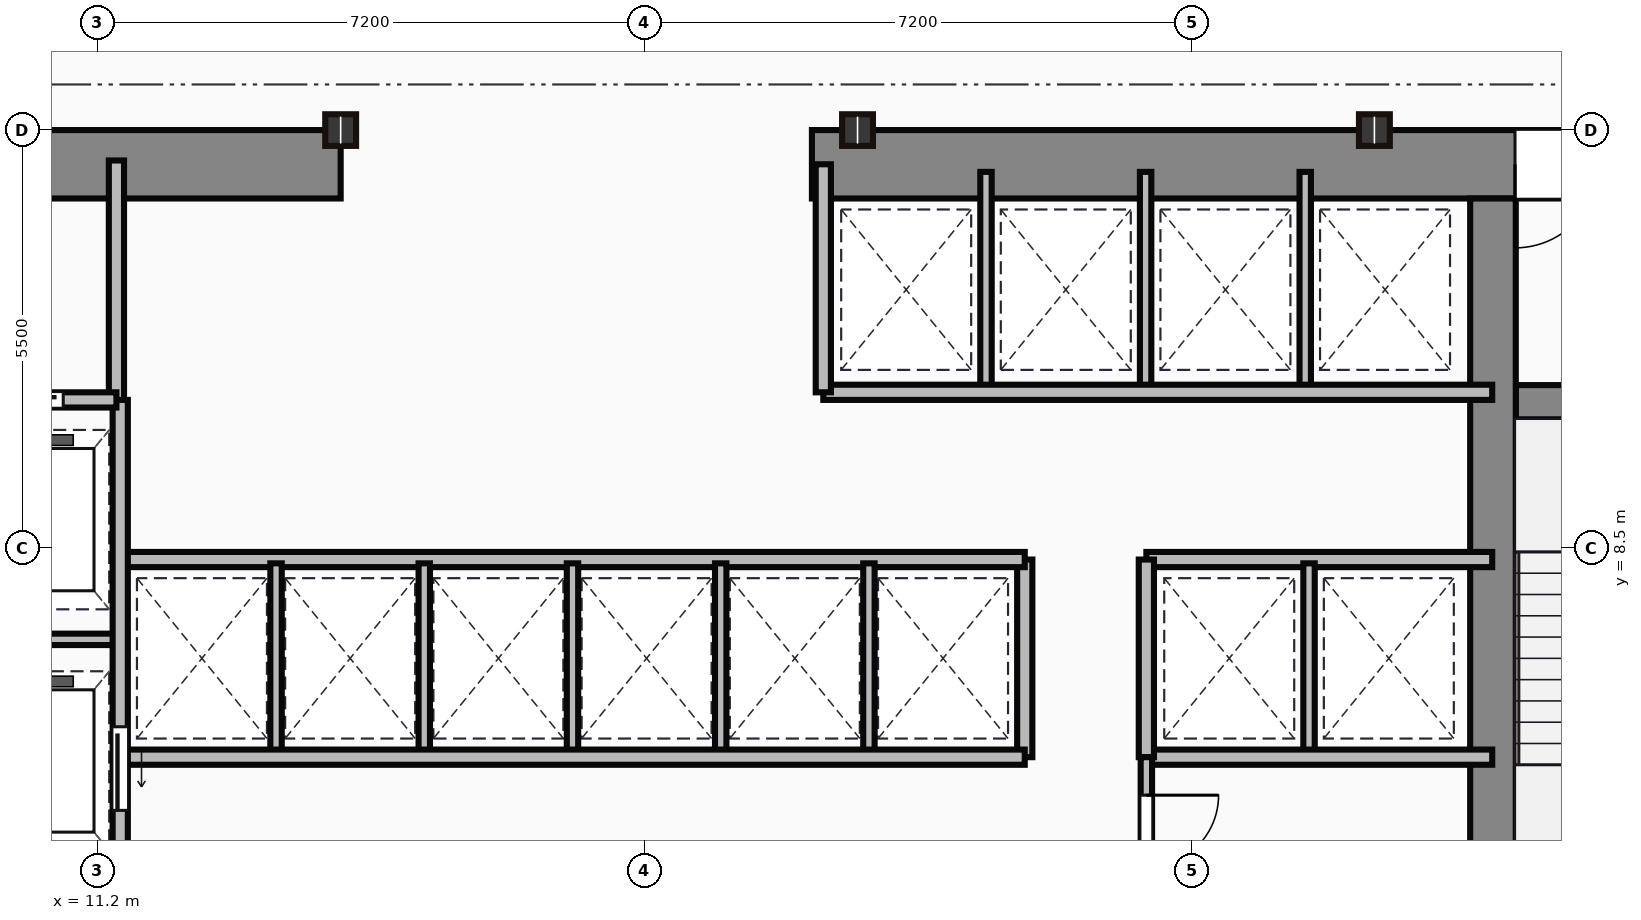
"""IFC4 building model, lengths in metres.
Left out: names, types, materials, properties, quantities, classifications, styles, units other than length and angle.
Written with IfcOpenShell. Run it as: python <this file> out.ifc"""

import sys

from ifc_helpers import new_model, si_unit, direction, frame, frame_2d, origin, origin_2d, place, context, subcontext, project, spatial, rectangle, i_section, extrude, source, transform, mapped, element, fill, save


model = new_model("IFC4")
c1 = context("Model", 3, precision=1e-05, world=origin(), true_north=direction((0.0, 1.0)))
c2 = subcontext(c1, "Body", "Model", "MODEL_VIEW")
j1 = project(units=[si_unit("LENGTHUNIT", "METRE"), si_unit("PLANEANGLEUNIT", "RADIAN")], contexts=[c1])
p1 = place(None, origin())
s1 = spatial("IfcSite", under=j1, at=p1, CompositionType="ELEMENT")
p2 = place(p1, origin())
s2 = spatial("IfcBuilding", under=s1, at=p2, CompositionType="ELEMENT")
p3 = place(p2, frame((0.0, 0.0, 47.1)))
s3 = spatial("IfcBuildingStorey", under=s2, at=p3, CompositionType="ELEMENT", Elevation=47.1)
m1 = source(origin(), c2, "Body", "SweptSolid", [
    extrude(rectangle(XDim=9.1, YDim=0.9, at=frame_2d((4.55, 0.0))), origin(), (0.0, 0.0, 1.0), 3.65),
])
p4 = place(p3, frame((5.3, 13.55, 0.0), z_axis=(0.0, 0.0, 1.0), x_axis=(1.0, 0.0, 0.0)))
e1 = element("IfcWall", 1, at=p4, inside=s3, PredefinedType="SHEAR", context=c2, shape_type="MappedRepresentation", body=[
    mapped(m1, transform((0.0, 0.0, 0.0))),
])
p5 = place(p4, frame((4.1, 0.0, 0.0)))
e2 = element("IfcOpeningElement", 2, at=p5, cuts=e1, PredefinedType="OPENING", context=c2, shape_type="SweptSolid", body=[
    extrude(rectangle(XDim=1.1, YDim=2.15, at=frame_2d((0.55, 1.075))), frame((0.0, 0.46, 0.0), z_axis=(0.0, -1.0, 0.0), x_axis=(1.0, 0.0, 0.0)), (0.0, 0.0, 1.0), 0.92),
])
m2 = source(origin(), c2, "Body", "SweptSolid", [
    extrude(rectangle(XDim=12.6, YDim=0.9, at=frame_2d((6.3, 0.0))), origin(), (0.0, 0.0, 1.0), 3.65),
])
p6 = place(p3, frame((20.6, 13.55, 0.0), z_axis=(0.0, 0.0, 1.0), x_axis=(1.0, 0.0, 0.0)))
e3 = element("IfcWall", 3, at=p6, inside=s3, PredefinedType="SHEAR", context=c2, shape_type="MappedRepresentation", body=[
    mapped(m2, transform((0.0, 0.0, 0.0))),
])
p7 = place(p6, frame((9.25, 0.0, 0.0)))
e4 = element("IfcOpeningElement", 4, at=p7, cuts=e3, PredefinedType="OPENING", context=c2, shape_type="SweptSolid", body=[
    extrude(rectangle(XDim=1.1, YDim=2.15, at=frame_2d((0.55, 1.075))), frame((0.0, 0.46, 0.0), z_axis=(0.0, -1.0, 0.0), x_axis=(1.0, 0.0, 0.0)), (0.0, 0.0, 1.0), 0.92),
])
m3 = source(origin(), c2, "Body", "SweptSolid", [
    extrude(rectangle(XDim=12.2, YDim=0.6, at=frame_2d((6.1, 0.0))), origin(), (0.0, 0.0, 1.0), 3.65),
])
p8 = place(p3, frame((29.56, 0.9, 0.0), z_axis=(0.0, 0.0, 1.0), x_axis=(0.0, 1.0, 0.0)))
e5 = element("IfcWall", 5, at=p8, inside=s3, PredefinedType="SHEAR", context=c2, shape_type="MappedRepresentation", body=[
    mapped(m3, transform((0.0, 0.0, 0.0))),
])
m4 = source(origin(), c2, "Body", "SweptSolid", [
    extrude(rectangle(XDim=3.39, YDim=0.45, at=frame_2d((1.695, 0.0))), origin(), (0.0, 0.0, 1.0), 3.65),
])
p9 = place(p3, frame((29.86, 10.42, 0.0), z_axis=(0.0, 0.0, 1.0), x_axis=(1.0, 0.0, 0.0)))
e6 = element("IfcWall", 6, at=p9, inside=s3, PredefinedType="SHEAR", context=c2, shape_type="MappedRepresentation", body=[
    mapped(m4, transform((0.0, 0.0, 0.0))),
])
p10 = place(p9, frame((1.1, 0.0, 0.0)))
e7 = element("IfcOpeningElement", 7, at=p10, cuts=e6, PredefinedType="OPENING", context=c2, shape_type="SweptSolid", body=[
    extrude(rectangle(XDim=1.1, YDim=2.15, at=frame_2d((0.55, 1.075))), frame((0.0, 0.235, 0.0), z_axis=(0.0, -1.0, 0.0), x_axis=(1.0, 0.0, 0.0)), (0.0, 0.0, 1.0), 0.47),
])
m5 = source(origin(), c2, "Body", "SweptSolid", [
    extrude(i_section(OverallWidth=0.406, OverallDepth=0.416, WebThickness=0.03, FlangeThickness=0.048, at=origin_2d()), origin(), (0.0, 0.0, 1.0), 3.65),
])
for number, where, z_axis, x_axis in (
    (8, (14.4, 14.0, 0.0), (0.0, 0.0, 1.0), (1.0, 0.0, 0.0)),
    (9, (21.2, 14.0, 0.0), (0.0, 0.0, 1.0), (1.0, 0.0, 0.0)),
    (10, (28.0, 14.0, 0.0), (0.0, 0.0, 1.0), (1.0, 0.0, 0.0)),
):
    element("IfcColumn", number, at=place(p3, frame(where, z_axis=z_axis, x_axis=x_axis)), inside=s3, PredefinedType="COLUMN", context=c2, shape_type="MappedRepresentation", body=[
        mapped(m5, transform((0.0, 0.0, 0.0))),
    ])
m6 = source(origin(), c2, "Body", "SweptSolid", [
    extrude(rectangle(XDim=3.18, YDim=0.2, at=frame_2d((1.59, 0.0))), origin(), (0.0, 0.0, 1.0), 3.4),
])
p11 = place(p3, frame((11.45, 10.42, 0.0), z_axis=(0.0, 0.0, 1.0), x_axis=(0.0, 1.0, 0.0)))
e11 = element("IfcWall", 11, at=p11, inside=s3, PredefinedType="PARTITIONING", context=c2, shape_type="MappedRepresentation", body=[
    mapped(m6, transform((0.0, 0.0, 0.0))),
])
m7 = source(origin(), c2, "Body", "SweptSolid", [
    extrude(rectangle(XDim=2.35, YDim=0.2, at=frame_2d((1.175, 0.0))), origin(), (0.0, 0.0, 1.0), 3.4),
])
p12 = place(p3, frame((9.1, 10.45, 0.0), z_axis=(0.0, 0.0, 1.0), x_axis=(1.0, 0.0, 0.0)))
e12 = element("IfcWall", 12, at=p12, inside=s3, PredefinedType="PARTITIONING", context=c2, shape_type="MappedRepresentation", body=[
    mapped(m7, transform((0.0, 0.0, 0.0))),
])
p13 = place(p12, frame((0.55, 0.0, 0.0)))
e13 = element("IfcOpeningElement", 13, at=p13, cuts=e12, PredefinedType="OPENING", context=c2, shape_type="SweptSolid", body=[
    extrude(rectangle(XDim=1.1, YDim=2.15, at=frame_2d((0.55, 1.075))), frame((0.0, 0.11, 0.0), z_axis=(0.0, -1.0, 0.0), x_axis=(1.0, 0.0, 0.0)), (0.0, 0.0, 1.0), 0.22),
])
m8 = source(origin(), c2, "Body", "SweptSolid", [
    extrude(rectangle(XDim=9.6, YDim=0.2, at=frame_2d((4.8, 0.0))), origin(), (0.0, 0.0, 1.0), 3.4),
])
p14 = place(p3, frame((11.5, 0.85, 0.0), z_axis=(0.0, 0.0, 1.0), x_axis=(0.0, 1.0, 0.0)))
e14 = element("IfcWall", 14, at=p14, inside=s3, PredefinedType="PARTITIONING", context=c2, shape_type="MappedRepresentation", body=[
    mapped(m8, transform((0.0, 0.0, 0.0))),
])
p15 = place(p14, frame((4.2, 0.0, 0.0)))
e15 = element("IfcOpeningElement", 15, at=p15, cuts=e14, PredefinedType="OPENING", context=c2, shape_type="SweptSolid", body=[
    extrude(rectangle(XDim=1.1, YDim=2.15, at=frame_2d((0.55, 1.075))), frame((0.0, 0.11, 0.0), z_axis=(0.0, -1.0, 0.0), x_axis=(1.0, 0.0, 0.0)), (0.0, 0.0, 1.0), 0.22),
])
p16 = place(p14, frame((0.9, 0.0, 0.0)))
e16 = element("IfcOpeningElement", 16, at=p16, cuts=e14, PredefinedType="OPENING", context=c2, shape_type="SweptSolid", body=[
    extrude(rectangle(XDim=1.2, YDim=2.15, at=frame_2d((0.6, 1.075))), frame((0.0, 0.11, 0.0), z_axis=(0.0, -1.0, 0.0), x_axis=(1.0, 0.0, 0.0)), (0.0, 0.0, 1.0), 0.22),
])
m9 = source(origin(), c2, "Body", "SweptSolid", [
    extrude(rectangle(XDim=2.4, YDim=0.15, at=frame_2d((1.2, 0.0))), origin(), (0.0, 0.0, 1.0), 3.4),
])
p17 = place(p3, frame((9.1, 7.3, 0.0), z_axis=(0.0, 0.0, 1.0), x_axis=(1.0, 0.0, 0.0)))
e17 = element("IfcWall", 17, at=p17, inside=s3, PredefinedType="PARTITIONING", context=c2, shape_type="MappedRepresentation", body=[
    mapped(m9, transform((0.0, 0.0, 0.0))),
])
m10 = source(origin(), c2, "Body", "SweptSolid", [
    extrude(rectangle(XDim=11.85, YDim=0.2, at=frame_2d((5.925, 0.0))), origin(), (0.0, 0.0, 1.0), 3.4),
])
for number, where, z_axis, x_axis in (
    (18, (11.55, 5.75, 0.0), (0.0, 0.0, 1.0), (1.0, 0.0, 0.0)),
    (19, (11.55, 8.35, 0.0), (0.0, 0.0, 1.0), (1.0, 0.0, 0.0)),
):
    element("IfcWall", number, at=place(p3, frame(where, z_axis=z_axis, x_axis=x_axis)), inside=s3, PredefinedType="PARTITIONING", context=c2, shape_type="MappedRepresentation", body=[
        mapped(m10, transform((0.0, 0.0, 0.0))),
    ])
m11 = source(origin(), c2, "Body", "SweptSolid", [
    extrude(rectangle(XDim=2.6, YDim=0.2, at=frame_2d((1.3, 0.0))), origin(), (0.0, 0.0, 1.0), 3.4),
])
p18 = place(p3, frame((23.4, 5.75, 0.0), z_axis=(0.0, 0.0, 1.0), x_axis=(0.0, 1.0, 0.0)))
e20 = element("IfcWall", 20, at=p18, inside=s3, PredefinedType="PARTITIONING", context=c2, shape_type="MappedRepresentation", body=[
    mapped(m11, transform((0.0, 0.0, 0.0))),
])
m12 = source(origin(), c2, "Body", "SweptSolid", [
    extrude(rectangle(XDim=2.5, YDim=0.15, at=frame_2d((1.25, 0.0))), origin(), (0.0, 0.0, 1.0), 3.4),
])
for number, where, z_axis, x_axis in (
    (21, (13.55, 5.8, 0.0), (0.0, 0.0, 1.0), (0.0, 1.0, 0.0)),
    (22, (15.5, 5.8, 0.0), (0.0, 0.0, 1.0), (0.0, 1.0, 0.0)),
    (23, (17.45, 5.8, 0.0), (0.0, 0.0, 1.0), (0.0, 1.0, 0.0)),
    (24, (19.4, 5.8, 0.0), (0.0, 0.0, 1.0), (0.0, 1.0, 0.0)),
    (25, (21.35, 5.8, 0.0), (0.0, 0.0, 1.0), (0.0, 1.0, 0.0)),
):
    element("IfcWall", number, at=place(p3, frame(where, z_axis=z_axis, x_axis=x_axis)), inside=s3, PredefinedType="PARTITIONING", context=c2, shape_type="MappedRepresentation", body=[
        mapped(m12, transform((0.0, 0.0, 0.0))),
    ])
m13 = source(origin(), c2, "Body", "SweptSolid", [
    extrude(rectangle(XDim=8.8, YDim=0.2, at=frame_2d((4.4, 0.0))), origin(), (0.0, 0.0, 1.0), 3.4),
])
p19 = place(p3, frame((20.75, 10.55, 0.0), z_axis=(0.0, 0.0, 1.0), x_axis=(1.0, 0.0, 0.0)))
e26 = element("IfcWall", 26, at=p19, inside=s3, PredefinedType="PARTITIONING", context=c2, shape_type="MappedRepresentation", body=[
    mapped(m13, transform((0.0, 0.0, 0.0))),
])
m14 = source(origin(), c2, "Body", "SweptSolid", [
    extrude(rectangle(XDim=3.0, YDim=0.2, at=frame_2d((1.5, 0.0))), origin(), (0.0, 0.0, 1.0), 3.4),
])
p20 = place(p3, frame((20.75, 10.55, 0.0), z_axis=(0.0, 0.0, 1.0), x_axis=(0.0, 1.0, 0.0)))
e27 = element("IfcWall", 27, at=p20, inside=s3, PredefinedType="PARTITIONING", context=c2, shape_type="MappedRepresentation", body=[
    mapped(m14, transform((0.0, 0.0, 0.0))),
])
m15 = source(origin(), c2, "Body", "SweptSolid", [
    extrude(rectangle(XDim=2.85, YDim=0.15, at=frame_2d((1.425, 0.0))), origin(), (0.0, 0.0, 1.0), 3.4),
])
for number, where, z_axis, x_axis in (
    (28, (22.89, 10.6, 0.0), (0.0, 0.0, 1.0), (0.0, 1.0, 0.0)),
    (29, (24.99, 10.6, 0.0), (0.0, 0.0, 1.0), (0.0, 1.0, 0.0)),
    (30, (27.09, 10.6, 0.0), (0.0, 0.0, 1.0), (0.0, 1.0, 0.0)),
):
    element("IfcWall", number, at=place(p3, frame(where, z_axis=z_axis, x_axis=x_axis)), inside=s3, PredefinedType="PARTITIONING", context=c2, shape_type="MappedRepresentation", body=[
        mapped(m15, transform((0.0, 0.0, 0.0))),
    ])
m16 = source(origin(), c2, "Body", "SweptSolid", [
    extrude(rectangle(XDim=4.55, YDim=0.2, at=frame_2d((2.275, 0.0))), origin(), (0.0, 0.0, 1.0), 3.4),
])
for number, where, z_axis, x_axis in (
    (31, (25.0, 8.35, 0.0), (0.0, 0.0, 1.0), (1.0, 0.0, 0.0)),
    (32, (25.0, 5.75, 0.0), (0.0, 0.0, 1.0), (1.0, 0.0, 0.0)),
):
    element("IfcWall", number, at=place(p3, frame(where, z_axis=z_axis, x_axis=x_axis)), inside=s3, PredefinedType="PARTITIONING", context=c2, shape_type="MappedRepresentation", body=[
        mapped(m16, transform((0.0, 0.0, 0.0))),
    ])
p21 = place(p3, frame((25.0, 5.75, 0.0), z_axis=(0.0, 0.0, 1.0), x_axis=(0.0, 1.0, 0.0)))
e33 = element("IfcWall", 33, at=p21, inside=s3, PredefinedType="PARTITIONING", context=c2, shape_type="MappedRepresentation", body=[
    mapped(m11, transform((0.0, 0.0, 0.0))),
])
p22 = place(p3, frame((27.14, 5.8, 0.0), z_axis=(0.0, 0.0, 1.0), x_axis=(0.0, 1.0, 0.0)))
e34 = element("IfcWall", 34, at=p22, inside=s3, PredefinedType="PARTITIONING", context=c2, shape_type="MappedRepresentation", body=[
    mapped(m12, transform((0.0, 0.0, 0.0))),
])
m17 = source(origin(), c2, "Body", "SweptSolid", [
    extrude(rectangle(XDim=4.9, YDim=0.15, at=frame_2d((2.45, 0.0))), origin(), (0.0, 0.0, 1.0), 3.4),
])
p23 = place(p3, frame((25.0, 0.85, 0.0), z_axis=(0.0, 0.0, 1.0), x_axis=(0.0, 1.0, 0.0)))
e35 = element("IfcWall", 35, at=p23, inside=s3, PredefinedType="PARTITIONING", context=c2, shape_type="MappedRepresentation", body=[
    mapped(m17, transform((0.0, 0.0, 0.0))),
])
p24 = place(p23, frame((1.8, 0.0, 0.0)))
e36 = element("IfcOpeningElement", 36, at=p24, cuts=e35, PredefinedType="OPENING", context=c2, shape_type="SweptSolid", body=[
    extrude(rectangle(XDim=0.95, YDim=2.15, at=frame_2d((0.475, 1.075))), frame((0.0, 0.085, 0.0), z_axis=(0.0, -1.0, 0.0), x_axis=(1.0, 0.0, 0.0)), (0.0, 0.0, 1.0), 0.17),
])
p25 = place(p23, frame((3.45, 0.0, 0.0)))
e37 = element("IfcOpeningElement", 37, at=p25, cuts=e35, PredefinedType="OPENING", context=c2, shape_type="SweptSolid", body=[
    extrude(rectangle(XDim=0.95, YDim=2.15, at=frame_2d((0.475, 1.075))), frame((0.0, 0.085, 0.0), z_axis=(0.0, -1.0, 0.0), x_axis=(1.0, 0.0, 0.0)), (0.0, 0.0, 1.0), 0.17),
])
m18 = source(origin(), c2, "Body", "SweptSolid", [
    extrude(rectangle(XDim=1.1, YDim=2.15, at=frame_2d((0.55, 1.075))), frame((0.0, 0.025, 0.0), z_axis=(0.0, -1.0, 0.0), x_axis=(1.0, 0.0, 0.0)), (0.0, 0.0, 1.0), 0.05),
])
p26 = place(p7, origin())
e38 = element("IfcDoor", 38, at=p26, inside=s3, OperationType="SINGLE_SWING_LEFT", PredefinedType="DOOR", context=c2, shape_type="MappedRepresentation", body=[
    mapped(m18, transform((0.0, 0.0, 0.0))),
])
fill(e4, e38)
p27 = place(p13, origin())
e39 = element("IfcDoor", 39, at=p27, inside=s3, OperationType="SLIDING_TO_LEFT", PredefinedType="DOOR", context=c2, shape_type="MappedRepresentation", body=[
    mapped(m18, transform((0.0, 0.0, 0.0))),
])
fill(e13, e39)
p28 = place(p15, frame((1.1, 0.0, 0.0), z_axis=(0.0, 0.0, 1.0), x_axis=(-1.0, 0.0, 0.0)))
e40 = element("IfcDoor", 40, at=p28, inside=s3, OperationType="SLIDING_TO_LEFT", PredefinedType="DOOR", context=c2, shape_type="MappedRepresentation", body=[
    mapped(m18, transform((0.0, 0.0, 0.0))),
])
fill(e15, e40)
m19 = source(origin(), c2, "Body", "SweptSolid", [
    extrude(rectangle(XDim=0.95, YDim=2.15, at=frame_2d((0.475, 1.075))), frame((0.0, 0.025, 0.0), z_axis=(0.0, -1.0, 0.0), x_axis=(1.0, 0.0, 0.0)), (0.0, 0.0, 1.0), 0.05),
])
p29 = place(p25, origin())
e41 = element("IfcDoor", 41, at=p29, inside=s3, OperationType="SINGLE_SWING_RIGHT", PredefinedType="DOOR", context=c2, shape_type="MappedRepresentation", body=[
    mapped(m19, transform((0.0, 0.0, 0.0))),
])
fill(e37, e41)
save(model, sys.argv[1])
